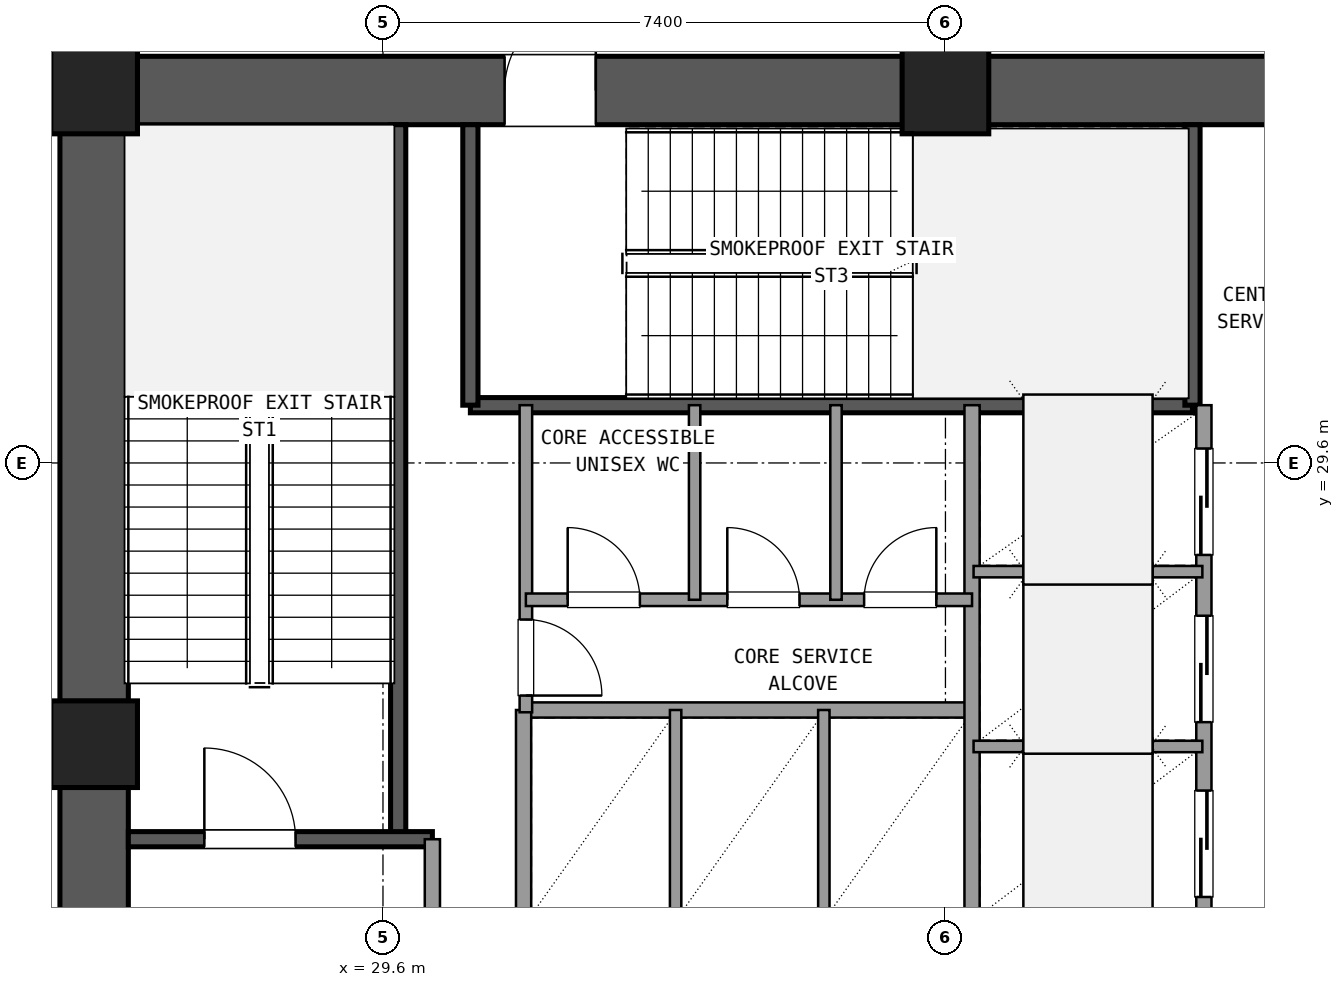
"""IFC4 building model, lengths in metres.
Left out: names, types, materials, properties, quantities, classifications, styles, units other than length and angle.
Written with IfcOpenShell. Run it as: python <this file> out.ifc"""

import sys

from ifc_helpers import new_model, si_unit, direction, frame, frame_2d, origin, origin_2d, place, context, subcontext, project, spatial, rectangle, extrude, element, fill, save


model = new_model("IFC4")
c1 = context("Model", 3, precision=1e-05, world=origin(), true_north=direction((0.0, 1.0)))
c2 = subcontext(c1, "Body", "Model", "MODEL_VIEW")
j1 = project(units=[si_unit("LENGTHUNIT", "METRE"), si_unit("PLANEANGLEUNIT", "RADIAN")], contexts=[c1])
p1 = place(None, origin())
s1 = spatial("IfcSite", under=j1, at=p1, CompositionType="ELEMENT")
p2 = place(p1, origin())
s2 = spatial("IfcBuilding", under=s1, at=p2, CompositionType="ELEMENT")
p3 = place(p2, frame((0.0, 0.0, 18.9)))
s3 = spatial("IfcBuildingStorey", under=s2, at=p3, CompositionType="ELEMENT", Elevation=18.9)
for number, where, z_axis, x_axis in (
    (1, (37.0, 34.5, 0.0), (0.0, 0.0, 1.0), (1.0, 0.0, 0.0)),
    (2, (25.8, 34.5, 0.0), (0.0, 0.0, 1.0), (1.0, 0.0, 0.0)),
    (3, (25.8, 25.9, 0.0), (0.0, 0.0, 1.0), (1.0, 0.0, 0.0)),
):
    element("IfcColumn", number, at=place(p3, frame(where, z_axis=z_axis, x_axis=x_axis)), inside=s3, PredefinedType="COLUMN", context=c2, shape_type="SweptSolid", body=[
        extrude(rectangle(XDim=1.14, YDim=1.14, at=origin_2d()), origin(), (0.0, 0.0, 1.0), 5.04),
    ])
p4 = place(p3, frame((47.635, 34.5, 0.0), z_axis=(0.0, 0.0, 1.0), x_axis=(-1.0, 0.0, 0.0)))
e4 = element("IfcWall", 4, at=p4, inside=s3, PredefinedType="SHEAR", context=c2, shape_type="SweptSolid", body=[
    extrude(rectangle(XDim=10.07, YDim=0.9, at=frame_2d((5.035, 0.0))), origin(), (0.0, 0.0, 1.0), 4.76),
])
p5 = place(p4, frame((4.535, 0.0, 0.0)))
e5 = element("IfcOpeningElement", 5, at=p5, cuts=e4, PredefinedType="OPENING", context=c2, shape_type="SweptSolid", body=[
    extrude(rectangle(XDim=1.6, YDim=2.2, at=frame_2d((0.8, 1.1))), frame((0.0, 0.46, 0.0), z_axis=(0.0, -1.0, 0.0), x_axis=(1.0, 0.0, 0.0)), (0.0, 0.0, 1.0), 0.92),
])
p6 = place(p3, frame((36.435, 34.5, 0.0), z_axis=(0.0, 0.0, 1.0), x_axis=(-1.0, 0.0, 0.0)))
e6 = element("IfcWall", 6, at=p6, inside=s3, PredefinedType="SHEAR", context=c2, shape_type="SweptSolid", body=[
    extrude(rectangle(XDim=10.07, YDim=0.9, at=frame_2d((5.035, 0.0))), origin(), (0.0, 0.0, 1.0), 4.76),
])
p7 = place(p6, frame((4.035, 0.0, 0.0)))
e7 = element("IfcOpeningElement", 7, at=p7, cuts=e6, PredefinedType="OPENING", context=c2, shape_type="SweptSolid", body=[
    extrude(rectangle(XDim=1.2, YDim=2.15, at=frame_2d((0.6, 1.075))), frame((0.0, 0.46, 0.0), z_axis=(0.0, -1.0, 0.0), x_axis=(1.0, 0.0, 0.0)), (0.0, 0.0, 1.0), 0.92),
])
p8 = place(p3, frame((25.8, 33.935, 0.0), z_axis=(0.0, 0.0, 1.0), x_axis=(0.0, -1.0, 0.0)))
e8 = element("IfcWall", 8, at=p8, inside=s3, PredefinedType="SHEAR", context=c2, shape_type="SweptSolid", body=[
    extrude(rectangle(XDim=7.47, YDim=0.9, at=frame_2d((3.735, 0.0))), origin(), (0.0, 0.0, 1.0), 4.76),
])
p9 = place(p3, frame((25.8, 25.335, 0.0), z_axis=(0.0, 0.0, 1.0), x_axis=(0.0, -1.0, 0.0)))
e9 = element("IfcWall", 9, at=p9, inside=s3, PredefinedType="SHEAR", context=c2, shape_type="SweptSolid", body=[
    extrude(rectangle(XDim=7.47, YDim=0.9, at=frame_2d((3.735, 0.0))), origin(), (0.0, 0.0, 1.0), 4.76),
])
p10 = place(p9, frame((2.085, 0.0, 0.0)))
e10 = element("IfcOpeningElement", 10, at=p10, cuts=e9, PredefinedType="OPENING", context=c2, shape_type="SweptSolid", body=[
    extrude(rectangle(XDim=1.2, YDim=2.15, at=frame_2d((0.6, 1.075))), frame((0.0, 0.46, 0.0), z_axis=(0.0, -1.0, 0.0), x_axis=(1.0, 0.0, 0.0)), (0.0, 0.0, 1.0), 0.92),
])
p11 = place(p3, frame((29.8, 24.65, 0.0), z_axis=(0.0, 0.0, 1.0), x_axis=(0.0, 1.0, 0.0)))
e11 = element("IfcWall", 11, at=p11, inside=s3, PredefinedType="SHEAR", context=c2, shape_type="SweptSolid", body=[
    extrude(rectangle(XDim=9.4, YDim=0.2, at=frame_2d((4.7, 0.0))), origin(), (0.0, 0.0, 1.0), 4.76),
])
p12 = place(p3, frame((26.25, 24.65, 0.0), z_axis=(0.0, 0.0, 1.0), x_axis=(1.0, 0.0, 0.0)))
e12 = element("IfcWall", 12, at=p12, inside=s3, PredefinedType="SHEAR", context=c2, shape_type="SweptSolid", body=[
    extrude(rectangle(XDim=4.0, YDim=0.2, at=frame_2d((2.0, 0.0))), origin(), (0.0, 0.0, 1.0), 4.76),
])
p13 = place(p12, frame((1.0, 0.0, 0.0)))
e13 = element("IfcOpeningElement", 13, at=p13, cuts=e12, PredefinedType="OPENING", context=c2, shape_type="SweptSolid", body=[
    extrude(rectangle(XDim=1.2, YDim=2.15, at=frame_2d((0.6, 1.075))), frame((0.0, 0.11, 0.0), z_axis=(0.0, -1.0, 0.0), x_axis=(1.0, 0.0, 0.0)), (0.0, 0.0, 1.0), 0.22),
])
p14 = place(p3, frame((30.75, 30.36, 0.0), z_axis=(0.0, 0.0, 1.0), x_axis=(1.0, 0.0, 0.0)))
e14 = element("IfcWall", 14, at=p14, inside=s3, PredefinedType="SHEAR", context=c2, shape_type="SweptSolid", body=[
    extrude(rectangle(XDim=9.5, YDim=0.2, at=frame_2d((4.75, 0.0))), origin(), (0.0, 0.0, 1.0), 4.76),
])
for number, where, z_axis, x_axis in (
    (15, (30.75, 30.36, 0.0), (0.0, 0.0, 1.0), (0.0, 1.0, 0.0)),
    (16, (40.25, 30.36, 0.0), (0.0, 0.0, 1.0), (0.0, 1.0, 0.0)),
):
    element("IfcWall", number, at=place(p3, frame(where, z_axis=z_axis, x_axis=x_axis)), inside=s3, PredefinedType="SHEAR", context=c2, shape_type="SweptSolid", body=[
        extrude(rectangle(XDim=3.69, YDim=0.2, at=frame_2d((1.845, 0.0))), origin(), (0.0, 0.0, 1.0), 4.76),
    ])
p15 = place(p3, frame((30.25, 17.75, 0.0), z_axis=(0.0, 0.0, 1.0), x_axis=(0.0, 1.0, 0.0)))
e17 = element("IfcWall", 17, at=p15, inside=s3, PredefinedType="SOLIDWALL", context=c2, shape_type="SweptSolid", body=[
    extrude(rectangle(XDim=6.9, YDim=0.2, at=frame_2d((3.45, 0.0))), origin(), (0.0, 0.0, 1.0), 3.13),
])
p16 = place(p15, frame((4.15, 0.0, 0.0)))
e18 = element("IfcOpeningElement", 18, at=p16, cuts=e17, PredefinedType="OPENING", context=c2, shape_type="SweptSolid", body=[
    extrude(rectangle(XDim=1.2, YDim=2.15, at=frame_2d((0.6, 1.075))), frame((0.0, 0.11, 0.0), z_axis=(0.0, -1.0, 0.0), x_axis=(1.0, 0.0, 0.0)), (0.0, 0.0, 1.0), 0.22),
])
p17 = place(p3, frame((31.45, 26.35, 0.0), z_axis=(0.0, 0.0, 1.0), x_axis=(1.0, 0.0, 0.0)))
e19 = element("IfcWall", 19, at=p17, inside=s3, PredefinedType="SOLIDWALL", context=c2, shape_type="SweptSolid", body=[
    extrude(rectangle(XDim=5.9, YDim=0.2, at=frame_2d((2.95, 0.0))), origin(), (0.0, 0.0, 1.0), 3.13),
])
p18 = place(p3, frame((31.45, 23.54, 0.0), z_axis=(0.0, 0.0, 1.0), x_axis=(0.0, 1.0, 0.0)))
e20 = element("IfcWall", 20, at=p18, inside=s3, PredefinedType="SOLIDWALL", context=c2, shape_type="SweptSolid", body=[
    extrude(rectangle(XDim=2.81, YDim=0.2, at=frame_2d((1.405, 0.0))), origin(), (0.0, 0.0, 1.0), 3.13),
])
for number, where, z_axis, x_axis in (
    (21, (33.45, 23.54, 0.0), (0.0, 0.0, 1.0), (0.0, 1.0, 0.0)),
    (22, (35.4, 23.54, 0.0), (0.0, 0.0, 1.0), (0.0, 1.0, 0.0)),
):
    element("IfcWall", number, at=place(p3, frame(where, z_axis=z_axis, x_axis=x_axis)), inside=s3, PredefinedType="PARTITIONING", context=c2, shape_type="SweptSolid", body=[
        extrude(rectangle(XDim=2.81, YDim=0.15, at=frame_2d((1.405, 0.0))), origin(), (0.0, 0.0, 1.0), 3.13),
    ])
p19 = place(p3, frame((37.35, 23.54, 0.0), z_axis=(0.0, 0.0, 1.0), x_axis=(0.0, 1.0, 0.0)))
e23 = element("IfcWall", 23, at=p19, inside=s3, PredefinedType="SOLIDWALL", context=c2, shape_type="SweptSolid", body=[
    extrude(rectangle(XDim=6.82, YDim=0.2, at=frame_2d((3.41, 0.0))), origin(), (0.0, 0.0, 1.0), 3.13),
])
p20 = place(p3, frame((40.4, 23.54, 0.0), z_axis=(0.0, 0.0, 1.0), x_axis=(0.0, 1.0, 0.0)))
e24 = element("IfcWall", 24, at=p20, inside=s3, PredefinedType="SOLIDWALL", context=c2, shape_type="SweptSolid", body=[
    extrude(rectangle(XDim=6.82, YDim=0.2, at=frame_2d((3.41, 0.0))), origin(), (0.0, 0.0, 1.0), 3.13),
])
p21 = place(p20, frame((0.35, 0.0, 0.0)))
e25 = element("IfcOpeningElement", 25, at=p21, cuts=e24, PredefinedType="OPENING", context=c2, shape_type="SweptSolid", body=[
    extrude(rectangle(XDim=1.4, YDim=2.2, at=frame_2d((0.7, 1.1))), frame((0.0, 0.11, 0.0), z_axis=(0.0, -1.0, 0.0), x_axis=(1.0, 0.0, 0.0)), (0.0, 0.0, 1.0), 0.22),
])
p22 = place(p20, frame((2.65, 0.0, 0.0)))
e26 = element("IfcOpeningElement", 26, at=p22, cuts=e24, PredefinedType="OPENING", context=c2, shape_type="SweptSolid", body=[
    extrude(rectangle(XDim=1.4, YDim=2.2, at=frame_2d((0.7, 1.1))), frame((0.0, 0.11, 0.0), z_axis=(0.0, -1.0, 0.0), x_axis=(1.0, 0.0, 0.0)), (0.0, 0.0, 1.0), 0.22),
])
p23 = place(p20, frame((4.85, 0.0, 0.0)))
e27 = element("IfcOpeningElement", 27, at=p23, cuts=e24, PredefinedType="OPENING", context=c2, shape_type="SweptSolid", body=[
    extrude(rectangle(XDim=1.4, YDim=2.2, at=frame_2d((0.7, 1.1))), frame((0.0, 0.11, 0.0), z_axis=(0.0, -1.0, 0.0), x_axis=(1.0, 0.0, 0.0)), (0.0, 0.0, 1.0), 0.22),
])
for number, where, z_axis, x_axis in (
    (28, (37.37, 25.87, 0.0), (0.0, 0.0, 1.0), (1.0, 0.0, 0.0)),
    (29, (37.37, 28.17, 0.0), (0.0, 0.0, 1.0), (1.0, 0.0, 0.0)),
):
    element("IfcWall", number, at=place(p3, frame(where, z_axis=z_axis, x_axis=x_axis)), inside=s3, PredefinedType="PARTITIONING", context=c2, shape_type="SweptSolid", body=[
        extrude(rectangle(XDim=3.01, YDim=0.15, at=frame_2d((1.505, 0.0))), origin(), (0.0, 0.0, 1.0), 3.13),
    ])
p24 = place(p3, frame((31.48, 26.32, 0.0), z_axis=(0.0, 0.0, 1.0), x_axis=(0.0, 1.0, 0.0)))
e30 = element("IfcWall", 30, at=p24, inside=s3, PredefinedType="PLUMBINGWALL", context=c2, shape_type="SweptSolid", body=[
    extrude(rectangle(XDim=4.04, YDim=0.165, at=frame_2d((2.02, 0.0))), origin(), (0.0, 0.0, 1.0), 3.13),
])
p25 = place(p24, frame((0.22, 0.0, 0.0)))
e31 = element("IfcOpeningElement", 31, at=p25, cuts=e30, PredefinedType="OPENING", context=c2, shape_type="SweptSolid", body=[
    extrude(rectangle(XDim=1.0, YDim=2.15, at=frame_2d((0.5, 1.075))), frame((0.0, 0.093, 0.0), z_axis=(0.0, -1.0, 0.0), x_axis=(1.0, 0.0, 0.0)), (0.0, 0.0, 1.0), 0.185),
])
p26 = place(p3, frame((31.48, 27.8, 0.0), z_axis=(0.0, 0.0, 1.0), x_axis=(1.0, 0.0, 0.0)))
e32 = element("IfcWall", 32, at=p26, inside=s3, PredefinedType="PLUMBINGWALL", context=c2, shape_type="SweptSolid", body=[
    extrude(rectangle(XDim=5.87, YDim=0.165, at=frame_2d((2.935, 0.0))), origin(), (0.0, 0.0, 1.0), 3.13),
])
p27 = place(p26, frame((0.55, 0.0, 0.0)))
e33 = element("IfcOpeningElement", 33, at=p27, cuts=e32, PredefinedType="OPENING", context=c2, shape_type="SweptSolid", body=[
    extrude(rectangle(XDim=0.95, YDim=2.1, at=frame_2d((0.475, 1.05))), frame((0.0, 0.093, 0.0), z_axis=(0.0, -1.0, 0.0), x_axis=(1.0, 0.0, 0.0)), (0.0, 0.0, 1.0), 0.185),
])
p28 = place(p26, frame((2.65, 0.0, 0.0)))
e34 = element("IfcOpeningElement", 34, at=p28, cuts=e32, PredefinedType="OPENING", context=c2, shape_type="SweptSolid", body=[
    extrude(rectangle(XDim=0.95, YDim=2.1, at=frame_2d((0.475, 1.05))), frame((0.0, 0.093, 0.0), z_axis=(0.0, -1.0, 0.0), x_axis=(1.0, 0.0, 0.0)), (0.0, 0.0, 1.0), 0.185),
])
p29 = place(p26, frame((4.45, 0.0, 0.0)))
e35 = element("IfcOpeningElement", 35, at=p29, cuts=e32, PredefinedType="OPENING", context=c2, shape_type="SweptSolid", body=[
    extrude(rectangle(XDim=0.95, YDim=2.1, at=frame_2d((0.475, 1.05))), frame((0.0, 0.093, 0.0), z_axis=(0.0, -1.0, 0.0), x_axis=(1.0, 0.0, 0.0)), (0.0, 0.0, 1.0), 0.185),
])
for number, where, z_axis, x_axis in (
    (36, (33.7, 27.8, 0.0), (0.0, 0.0, 1.0), (0.0, 1.0, 0.0)),
    (37, (35.56, 27.8, 0.0), (0.0, 0.0, 1.0), (0.0, 1.0, 0.0)),
):
    element("IfcWall", number, at=place(p3, frame(where, z_axis=z_axis, x_axis=x_axis)), inside=s3, PredefinedType="PARTITIONING", context=c2, shape_type="SweptSolid", body=[
        extrude(rectangle(XDim=2.56, YDim=0.15, at=frame_2d((1.28, 0.0))), origin(), (0.0, 0.0, 1.0), 3.13),
    ])
p30 = place(p13, origin())
e38 = element("IfcDoor", 38, at=p30, inside=s3, OperationType="SINGLE_SWING_LEFT", PredefinedType="DOOR", context=c2, shape_type="SweptSolid", body=[
    extrude(rectangle(XDim=1.2, YDim=2.15, at=frame_2d((0.6, 1.075))), frame((0.0, 0.025, 0.0), z_axis=(0.0, -1.0, 0.0), x_axis=(1.0, 0.0, 0.0)), (0.0, 0.0, 1.0), 0.05),
])
fill(e13, e38)
p31 = place(p7, frame((1.2, 0.0, 0.0), z_axis=(0.0, 0.0, 1.0), x_axis=(-1.0, 0.0, 0.0)))
e39 = element("IfcDoor", 39, at=p31, inside=s3, OperationType="SINGLE_SWING_LEFT", PredefinedType="DOOR", context=c2, shape_type="SweptSolid", body=[
    extrude(rectangle(XDim=1.2, YDim=2.15, at=frame_2d((0.6, 1.075))), frame((0.0, 0.025, 0.0), z_axis=(0.0, -1.0, 0.0), x_axis=(1.0, 0.0, 0.0)), (0.0, 0.0, 1.0), 0.05),
])
fill(e7, e39)
p32 = place(p21, origin())
e40 = element("IfcDoor", 40, at=p32, inside=s3, OperationType="SLIDING_TO_LEFT", PredefinedType="DOOR", context=c2, shape_type="SweptSolid", body=[
    extrude(rectangle(XDim=1.4, YDim=2.2, at=frame_2d((0.7, 1.1))), frame((0.0, 0.025, 0.0), z_axis=(0.0, -1.0, 0.0), x_axis=(1.0, 0.0, 0.0)), (0.0, 0.0, 1.0), 0.05),
])
fill(e25, e40)
p33 = place(p22, origin())
e41 = element("IfcDoor", 41, at=p33, inside=s3, OperationType="SLIDING_TO_LEFT", PredefinedType="DOOR", context=c2, shape_type="SweptSolid", body=[
    extrude(rectangle(XDim=1.4, YDim=2.2, at=frame_2d((0.7, 1.1))), frame((0.0, 0.025, 0.0), z_axis=(0.0, -1.0, 0.0), x_axis=(1.0, 0.0, 0.0)), (0.0, 0.0, 1.0), 0.05),
])
fill(e26, e41)
p34 = place(p23, origin())
e42 = element("IfcDoor", 42, at=p34, inside=s3, OperationType="SLIDING_TO_RIGHT", PredefinedType="DOOR", context=c2, shape_type="SweptSolid", body=[
    extrude(rectangle(XDim=1.4, YDim=2.2, at=frame_2d((0.7, 1.1))), frame((0.0, 0.025, 0.0), z_axis=(0.0, -1.0, 0.0), x_axis=(1.0, 0.0, 0.0)), (0.0, 0.0, 1.0), 0.05),
])
fill(e27, e42)
p35 = place(p25, frame((1.0, 0.0, 0.0), z_axis=(0.0, 0.0, 1.0), x_axis=(-1.0, 0.0, 0.0)))
e43 = element("IfcDoor", 43, at=p35, inside=s3, OperationType="SINGLE_SWING_LEFT", PredefinedType="DOOR", context=c2, shape_type="SweptSolid", body=[
    extrude(rectangle(XDim=1.0, YDim=2.15, at=frame_2d((0.5, 1.075))), frame((0.0, 0.025, 0.0), z_axis=(0.0, -1.0, 0.0), x_axis=(1.0, 0.0, 0.0)), (0.0, 0.0, 1.0), 0.05),
])
fill(e31, e43)
p36 = place(p27, origin())
e44 = element("IfcDoor", 44, at=p36, inside=s3, OperationType="SINGLE_SWING_LEFT", PredefinedType="DOOR", context=c2, shape_type="SweptSolid", body=[
    extrude(rectangle(XDim=0.95, YDim=2.1, at=frame_2d((0.475, 1.05))), frame((0.0, 0.025, 0.0), z_axis=(0.0, -1.0, 0.0), x_axis=(1.0, 0.0, 0.0)), (0.0, 0.0, 1.0), 0.05),
])
fill(e33, e44)
p37 = place(p28, origin())
e45 = element("IfcDoor", 45, at=p37, inside=s3, OperationType="SINGLE_SWING_LEFT", PredefinedType="DOOR", context=c2, shape_type="SweptSolid", body=[
    extrude(rectangle(XDim=0.95, YDim=2.1, at=frame_2d((0.475, 1.05))), frame((0.0, 0.025, 0.0), z_axis=(0.0, -1.0, 0.0), x_axis=(1.0, 0.0, 0.0)), (0.0, 0.0, 1.0), 0.05),
])
fill(e34, e45)
p38 = place(p29, origin())
e46 = element("IfcDoor", 46, at=p38, inside=s3, OperationType="SINGLE_SWING_RIGHT", PredefinedType="DOOR", context=c2, shape_type="SweptSolid", body=[
    extrude(rectangle(XDim=0.95, YDim=2.1, at=frame_2d((0.475, 1.05))), frame((0.0, 0.025, 0.0), z_axis=(0.0, -1.0, 0.0), x_axis=(1.0, 0.0, 0.0)), (0.0, 0.0, 1.0), 0.05),
])
fill(e35, e46)
save(model, sys.argv[1])
